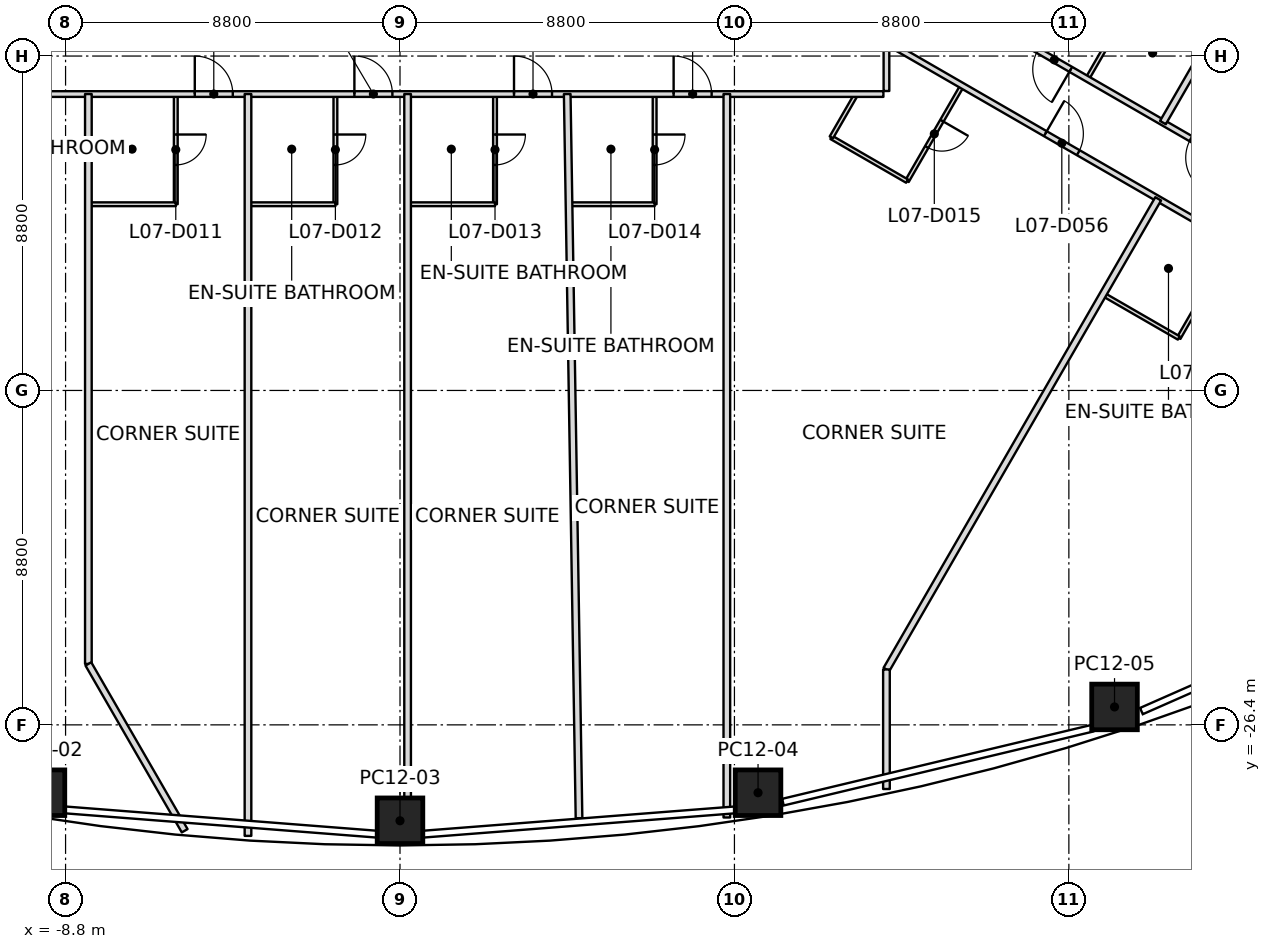
"""IFC4 building model, lengths in metres.
Left out: names, types, materials, properties, quantities, classifications, styles, units other than length and angle.
Written with IfcOpenShell. Run it as: python <this file> out.ifc"""

import sys

from ifc_helpers import new_model, si_unit, direction, frame, frame_2d, origin, origin_2d, place, context, subcontext, project, spatial, rectangle, extrude, clip, halfspace, element, fill, save


model = new_model("IFC4")
c1 = context("Model", 3, precision=1e-05, world=origin(), true_north=direction((0.0, 1.0)))
c2 = subcontext(c1, "Body", "Model", "MODEL_VIEW")
j1 = project(units=[si_unit("LENGTHUNIT", "METRE"), si_unit("PLANEANGLEUNIT", "RADIAN")], contexts=[c1])
p1 = place(None, origin())
s1 = spatial("IfcSite", under=j1, at=p1, CompositionType="ELEMENT")
p2 = place(p1, origin())
s2 = spatial("IfcBuilding", under=s1, at=p2, CompositionType="ELEMENT")
p3 = place(p2, frame((0.0, 0.0, 48.0)))
s3 = spatial("IfcBuildingStorey", under=s2, at=p3, CompositionType="ELEMENT", Elevation=48.0)
p4 = place(p3, frame((-9.421, -28.186, 0.0), z_axis=(0.00938738074, 0.224525572229, 0.97442298028), x_axis=(0.980605744382, -0.192842524507, 0.034987638199)))
e1 = element("IfcColumn", 1, at=p4, inside=s3, PredefinedType="COLUMN", context=c2, shape_type="SweptSolid", body=[
    clip(extrude(rectangle(XDim=1.2, YDim=1.2, at=origin_2d()), origin(), (0.0, 0.0, 1.0), 3.797), halfspace(frame((0.0, 0.0, 0.008)), True)),
])
p5 = place(p3, frame((0.0, -28.924, 0.0), z_axis=(0.0, 0.238749489976, 0.971081191784), x_axis=(-1.0, 0.0, 0.0)))
e2 = element("IfcColumn", 2, at=p5, inside=s3, PredefinedType="COLUMN", context=c2, shape_type="SweptSolid", body=[
    clip(extrude(rectangle(XDim=1.2, YDim=1.2, at=origin_2d()), origin(), (0.0, 0.0, 1.0), 3.81), halfspace(frame((0.0, 0.0, 0.009)), True)),
])
p6 = place(p3, frame((9.421, -28.186, 0.0), z_axis=(-0.00938738074, 0.224525572229, 0.97442298028), x_axis=(-0.980605744382, -0.192842524507, 0.034987638199)))
e3 = element("IfcColumn", 3, at=p6, inside=s3, PredefinedType="COLUMN", context=c2, shape_type="SweptSolid", body=[
    clip(extrude(rectangle(XDim=1.2, YDim=1.2, at=origin_2d()), origin(), (0.0, 0.0, 1.0), 3.797), halfspace(frame((0.0, 0.0, 0.008)), True)),
])
p7 = place(p3, frame((18.802, -25.928, 0.0), z_axis=(-0.019020345186, 0.17825893475, 0.983799765527), x_axis=(0.950332394894, 0.308956292564, -0.037607824987)))
e4 = element("IfcColumn", 4, at=p7, inside=s3, PredefinedType="COLUMN", context=c2, shape_type="SweptSolid", body=[
    clip(clip(extrude(rectangle(XDim=1.2, YDim=1.2, at=origin_2d()), origin(), (0.0, 0.0, 1.0), 3.761), halfspace(frame((0.0, 0.0, 0.008)), True)), halfspace(frame((0.0, 0.0, 3.76)), False)),
])
p8 = place(p3, frame((-8.2, -9.8, 0.0), z_axis=(0.0, 0.0, 1.0), x_axis=(0.0, -1.0, 0.0)))
e5 = element("IfcWall", 5, at=p8, inside=s3, PredefinedType="PARTITIONING", context=c2, shape_type="SweptSolid", body=[
    extrude(rectangle(XDim=14.997, YDim=0.175, at=frame_2d((7.498, 0.0))), origin(), (0.0, 0.0, 1.0), 3.15),
])
p9 = place(p3, frame((-8.2, -24.797, 0.0), z_axis=(0.0, 0.0, 1.0), x_axis=(0.499987891935, -0.866032394266, 0.0)))
e6 = element("IfcWall", 6, at=p9, inside=s3, PredefinedType="PARTITIONING", context=c2, shape_type="SweptSolid", body=[
    extrude(rectangle(XDim=5.069, YDim=0.175, at=frame_2d((2.535, 0.0))), origin(), (0.0, 0.0, 1.0), 2.934),
])
p10 = place(p3, frame((-4.0, -9.8, 0.0), z_axis=(0.0, 0.0, 1.0), x_axis=(0.0, -1.0, 0.0)))
e7 = element("IfcWall", 7, at=p10, inside=s3, PredefinedType="PARTITIONING", context=c2, shape_type="SweptSolid", body=[
    extrude(rectangle(XDim=19.521, YDim=0.175, at=frame_2d((9.761, 0.0))), origin(), (0.0, 0.0, 1.0), 2.934),
])
p11 = place(p3, frame((0.2, -9.8, 0.0), z_axis=(0.0, 0.0, 1.0), x_axis=(0.0, -1.0, 0.0)))
e8 = element("IfcWall", 8, at=p11, inside=s3, PredefinedType="PARTITIONING", context=c2, shape_type="SweptSolid", body=[
    extrude(rectangle(XDim=19.65, YDim=0.175, at=frame_2d((9.825, 0.0))), origin(), (0.0, 0.0, 1.0), 3.15),
])
p12 = place(p3, frame((4.4, -9.8, 0.0), z_axis=(0.0, 0.0, 1.0), x_axis=(0.016306426633, -0.999867041386, 0.0)))
e9 = element("IfcWall", 9, at=p12, inside=s3, PredefinedType="PARTITIONING", context=c2, shape_type="SweptSolid", body=[
    extrude(rectangle(XDim=19.059, YDim=0.175, at=frame_2d((9.53, 0.0))), origin(), (0.0, 0.0, 1.0), 2.934),
])
p13 = place(p3, frame((8.6, -9.8, 0.0), z_axis=(0.0, 0.0, 1.0), x_axis=(0.0, -1.0, 0.0)))
e10 = element("IfcWall", 10, at=p13, inside=s3, PredefinedType="PARTITIONING", context=c2, shape_type="SweptSolid", body=[
    extrude(rectangle(XDim=19.037, YDim=0.175, at=frame_2d((9.519, 0.0))), origin(), (0.0, 0.0, 1.0), 2.934),
])
p14 = place(p3, frame((19.95, -12.558, 0.0), z_axis=(0.0, 0.0, 1.0), x_axis=(-0.500004228592, -0.866022962392, 0.0)))
e11 = element("IfcWall", 11, at=p14, inside=s3, PredefinedType="PARTITIONING", context=c2, shape_type="SweptSolid", body=[
    extrude(rectangle(XDim=14.3, YDim=0.175, at=frame_2d((7.15, 0.0))), origin(), (0.0, 0.0, 1.0), 2.797),
])
p15 = place(p3, frame((12.8, -24.942, 0.0), z_axis=(0.0, 0.0, 1.0), x_axis=(0.0, -1.0, 0.0)))
e12 = element("IfcWall", 12, at=p15, inside=s3, PredefinedType="PARTITIONING", context=c2, shape_type="SweptSolid", body=[
    extrude(rectangle(XDim=3.146, YDim=0.175, at=frame_2d((1.573, 0.0))), origin(), (0.0, 0.0, 1.0), 2.934),
])
p16 = place(p3, frame((20.075, -10.551, 0.0), z_axis=(0.0, 0.0, 1.0), x_axis=(0.499996220184, 0.866027586051, 0.0)))
e13 = element("IfcWall", 13, at=p16, inside=s3, PredefinedType="PARTITIONING", context=c2, shape_type="SweptSolid", body=[
    extrude(rectangle(XDim=12.274, YDim=0.175, at=frame_2d((6.137, 0.0))), origin(), (0.0, 0.0, 1.0), 2.934),
])
p17 = place(p3, frame((-12.72, -9.8, 0.0), z_axis=(0.0, 0.0, 1.0), x_axis=(1.0, 0.0, 0.0)))
e14 = element("IfcWall", 14, at=p17, inside=s3, PredefinedType="PARTITIONING", context=c2, shape_type="SweptSolid", body=[
    extrude(rectangle(XDim=25.44, YDim=0.15, at=frame_2d((12.72, 0.0))), origin(), (0.0, 0.0, 1.0), 2.947),
])
p18 = place(p17, frame((7.32, 0.0, 0.0)))
e15 = element("IfcOpeningElement", 15, at=p18, cuts=e14, PredefinedType="OPENING", context=c2, shape_type="SweptSolid", body=[
    extrude(rectangle(XDim=1.0, YDim=2.1, at=frame_2d((0.5, 1.05))), frame((0.0, 0.075, 0.0), z_axis=(0.0, -1.0, 0.0), x_axis=(1.0, 0.0, 0.0)), (0.0, 0.0, 1.0), 0.15),
])
p19 = place(p17, frame((11.52, 0.0, 0.0)))
e16 = element("IfcOpeningElement", 16, at=p19, cuts=e14, PredefinedType="OPENING", context=c2, shape_type="SweptSolid", body=[
    extrude(rectangle(XDim=1.0, YDim=2.1, at=frame_2d((0.5, 1.05))), frame((0.0, 0.075, 0.0), z_axis=(0.0, -1.0, 0.0), x_axis=(1.0, 0.0, 0.0)), (0.0, 0.0, 1.0), 0.15),
])
p20 = place(p17, frame((15.72, 0.0, 0.0)))
e17 = element("IfcOpeningElement", 17, at=p20, cuts=e14, PredefinedType="OPENING", context=c2, shape_type="SweptSolid", body=[
    extrude(rectangle(XDim=1.0, YDim=2.1, at=frame_2d((0.5, 1.05))), frame((0.0, 0.075, 0.0), z_axis=(0.0, -1.0, 0.0), x_axis=(1.0, 0.0, 0.0)), (0.0, 0.0, 1.0), 0.15),
])
p21 = place(p17, frame((19.92, 0.0, 0.0)))
e18 = element("IfcOpeningElement", 18, at=p21, cuts=e14, PredefinedType="OPENING", context=c2, shape_type="SweptSolid", body=[
    extrude(rectangle(XDim=1.0, YDim=2.1, at=frame_2d((0.5, 1.05))), frame((0.0, 0.075, 0.0), z_axis=(0.0, -1.0, 0.0), x_axis=(1.0, 0.0, 0.0)), (0.0, 0.0, 1.0), 0.15),
])
p22 = place(p3, frame((12.8, -9.72, 0.0), z_axis=(0.0, 0.0, 1.0), x_axis=(0.0, 1.0, 0.0)))
e19 = element("IfcWall", 19, at=p22, inside=s3, PredefinedType="PARTITIONING", context=c2, shape_type="SweptSolid", body=[
    extrude(rectangle(XDim=1.291, YDim=0.15, at=frame_2d((0.646, 0.0))), origin(), (0.0, 0.0, 1.0), 2.797),
])
p23 = place(p3, frame((12.879, -8.475, 0.0), z_axis=(0.0, 0.0, 1.0), x_axis=(0.866021836803, -0.500006178143, 0.0)))
e20 = element("IfcWall", 20, at=p23, inside=s3, PredefinedType="PARTITIONING", context=c2, shape_type="SweptSolid", body=[
    extrude(rectangle(XDim=12.365, YDim=0.15, at=frame_2d((6.182, 0.0))), origin(), (0.0, 0.0, 1.0), 2.797),
])
p24 = place(p23, frame((4.737, 0.0, 0.0)))
e21 = element("IfcOpeningElement", 21, at=p24, cuts=e20, PredefinedType="OPENING", context=c2, shape_type="SweptSolid", body=[
    extrude(rectangle(XDim=1.0, YDim=2.1, at=frame_2d((0.5, 1.05))), frame((0.0, 0.075, 0.0), z_axis=(0.0, -1.0, 0.0), x_axis=(1.0, 0.0, 0.0)), (0.0, 0.0, 1.0), 0.15),
])
p25 = place(p23, frame((10.965, 0.0, 0.0)))
e22 = element("IfcOpeningElement", 22, at=p25, cuts=e20, PredefinedType="OPENING", context=c2, shape_type="SweptSolid", body=[
    extrude(rectangle(XDim=1.0, YDim=2.1, at=frame_2d((0.5, 1.05))), frame((0.0, 0.075, 0.0), z_axis=(0.0, -1.0, 0.0), x_axis=(1.0, 0.0, 0.0)), (0.0, 0.0, 1.0), 0.15),
])
p26 = place(p3, frame((24.418, -13.059, 0.0), z_axis=(0.0, 0.0, 1.0), x_axis=(-0.866024967305, 0.500000756004, 0.0)))
e23 = element("IfcWall", 23, at=p26, inside=s3, PredefinedType="PARTITIONING", context=c2, shape_type="SweptSolid", body=[
    extrude(rectangle(XDim=13.416, YDim=0.15, at=frame_2d((6.708, 0.0))), origin(), (0.0, 0.0, 1.0), 2.947),
])
p27 = place(p26, frame((3.168, 0.0, 0.0)))
e24 = element("IfcOpeningElement", 24, at=p27, cuts=e23, PredefinedType="OPENING", context=c2, shape_type="SweptSolid", body=[
    extrude(rectangle(XDim=1.0, YDim=2.1, at=frame_2d((0.5, 1.05))), frame((0.0, 0.075, 0.0), z_axis=(0.0, -1.0, 0.0), x_axis=(1.0, 0.0, 0.0)), (0.0, 0.0, 1.0), 0.15),
])
p28 = place(p26, frame((7.815, 0.0, 0.0)))
e25 = element("IfcOpeningElement", 25, at=p28, cuts=e23, PredefinedType="OPENING", context=c2, shape_type="SweptSolid", body=[
    extrude(rectangle(XDim=1.0, YDim=2.1, at=frame_2d((0.5, 1.05))), frame((0.0, 0.075, 0.0), z_axis=(0.0, -1.0, 0.0), x_axis=(1.0, 0.0, 0.0)), (0.0, 0.0, 1.0), 0.15),
])
p29 = place(p3, frame((-5.9, -9.83, 0.0), z_axis=(0.0, 0.0, 1.0), x_axis=(0.0, -1.0, 0.0)))
e26 = element("IfcWall", 26, at=p29, inside=s3, PredefinedType="PARTITIONING", context=c2, shape_type="SweptSolid", body=[
    extrude(rectangle(XDim=2.87, YDim=0.1, at=frame_2d((1.435, 0.0))), origin(), (0.0, 0.0, 1.0), 3.15),
])
p30 = place(p29, frame((1.035, 0.0, 0.0)))
e27 = element("IfcOpeningElement", 27, at=p30, cuts=e26, PredefinedType="OPENING", context=c2, shape_type="SweptSolid", body=[
    extrude(rectangle(XDim=0.8, YDim=2.1, at=frame_2d((0.4, 1.05))), frame((0.0, 0.05, 0.0), z_axis=(0.0, -1.0, 0.0), x_axis=(1.0, 0.0, 0.0)), (0.0, 0.0, 1.0), 0.1),
])
p31 = place(p3, frame((-5.9, -12.7, 0.0), z_axis=(0.0, 0.0, 1.0), x_axis=(-1.0, 0.0, 0.0)))
e28 = element("IfcWall", 28, at=p31, inside=s3, PredefinedType="PARTITIONING", context=c2, shape_type="SweptSolid", body=[
    extrude(rectangle(XDim=2.27, YDim=0.1, at=frame_2d((1.135, 0.0))), origin(), (0.0, 0.0, 1.0), 2.947),
])
p32 = place(p3, frame((-1.7, -9.83, 0.0), z_axis=(0.0, 0.0, 1.0), x_axis=(0.0, -1.0, 0.0)))
e29 = element("IfcWall", 29, at=p32, inside=s3, PredefinedType="PARTITIONING", context=c2, shape_type="SweptSolid", body=[
    extrude(rectangle(XDim=2.87, YDim=0.1, at=frame_2d((1.435, 0.0))), origin(), (0.0, 0.0, 1.0), 3.15),
])
p33 = place(p32, frame((1.035, 0.0, 0.0)))
e30 = element("IfcOpeningElement", 30, at=p33, cuts=e29, PredefinedType="OPENING", context=c2, shape_type="SweptSolid", body=[
    extrude(rectangle(XDim=0.8, YDim=2.1, at=frame_2d((0.4, 1.05))), frame((0.0, 0.05, 0.0), z_axis=(0.0, -1.0, 0.0), x_axis=(1.0, 0.0, 0.0)), (0.0, 0.0, 1.0), 0.1),
])
p34 = place(p3, frame((-1.7, -12.7, 0.0), z_axis=(0.0, 0.0, 1.0), x_axis=(-1.0, 0.0, 0.0)))
e31 = element("IfcWall", 31, at=p34, inside=s3, PredefinedType="PARTITIONING", context=c2, shape_type="SweptSolid", body=[
    extrude(rectangle(XDim=2.27, YDim=0.1, at=frame_2d((1.135, 0.0))), origin(), (0.0, 0.0, 1.0), 2.947),
])
p35 = place(p3, frame((2.5, -9.83, 0.0), z_axis=(0.0, 0.0, 1.0), x_axis=(0.0, -1.0, 0.0)))
e32 = element("IfcWall", 32, at=p35, inside=s3, PredefinedType="PARTITIONING", context=c2, shape_type="SweptSolid", body=[
    extrude(rectangle(XDim=2.87, YDim=0.1, at=frame_2d((1.435, 0.0))), origin(), (0.0, 0.0, 1.0), 3.15),
])
p36 = place(p35, frame((1.035, 0.0, 0.0)))
e33 = element("IfcOpeningElement", 33, at=p36, cuts=e32, PredefinedType="OPENING", context=c2, shape_type="SweptSolid", body=[
    extrude(rectangle(XDim=0.8, YDim=2.1, at=frame_2d((0.4, 1.05))), frame((0.0, 0.05, 0.0), z_axis=(0.0, -1.0, 0.0), x_axis=(1.0, 0.0, 0.0)), (0.0, 0.0, 1.0), 0.1),
])
p37 = place(p3, frame((2.5, -12.7, 0.0), z_axis=(0.0, 0.0, 1.0), x_axis=(-1.0, 0.0, 0.0)))
e34 = element("IfcWall", 34, at=p37, inside=s3, PredefinedType="PARTITIONING", context=c2, shape_type="SweptSolid", body=[
    extrude(rectangle(XDim=2.27, YDim=0.1, at=frame_2d((1.135, 0.0))), origin(), (0.0, 0.0, 1.0), 3.15),
])
p38 = place(p3, frame((6.7, -9.83, 0.0), z_axis=(0.0, 0.0, 1.0), x_axis=(0.0, -1.0, 0.0)))
e35 = element("IfcWall", 35, at=p38, inside=s3, PredefinedType="PARTITIONING", context=c2, shape_type="SweptSolid", body=[
    extrude(rectangle(XDim=2.87, YDim=0.1, at=frame_2d((1.435, 0.0))), origin(), (0.0, 0.0, 1.0), 3.15),
])
p39 = place(p38, frame((1.035, 0.0, 0.0)))
e36 = element("IfcOpeningElement", 36, at=p39, cuts=e35, PredefinedType="OPENING", context=c2, shape_type="SweptSolid", body=[
    extrude(rectangle(XDim=0.8, YDim=2.1, at=frame_2d((0.4, 1.05))), frame((0.0, 0.05, 0.0), z_axis=(0.0, -1.0, 0.0), x_axis=(1.0, 0.0, 0.0)), (0.0, 0.0, 1.0), 0.1),
])
p40 = place(p3, frame((6.7, -12.7, 0.0), z_axis=(0.0, 0.0, 1.0), x_axis=(-1.0, 0.0, 0.0)))
e37 = element("IfcWall", 37, at=p40, inside=s3, PredefinedType="PARTITIONING", context=c2, shape_type="SweptSolid", body=[
    extrude(rectangle(XDim=2.27, YDim=0.1, at=frame_2d((1.135, 0.0))), origin(), (0.0, 0.0, 1.0), 2.947),
])
p41 = place(p3, frame((14.777, -9.605, 0.0), z_axis=(0.0, 0.0, 1.0), x_axis=(-0.499999802827, -0.866025517622, 0.0)))
e38 = element("IfcWall", 38, at=p41, inside=s3, PredefinedType="PARTITIONING", context=c2, shape_type="SweptSolid", body=[
    extrude(rectangle(XDim=2.87, YDim=0.1, at=frame_2d((1.435, 0.0))), origin(), (0.0, 0.0, 1.0), 2.797),
])
p42 = place(p41, frame((1.035, 0.0, 0.0)))
e39 = element("IfcOpeningElement", 39, at=p42, cuts=e38, PredefinedType="OPENING", context=c2, shape_type="SweptSolid", body=[
    extrude(rectangle(XDim=0.8, YDim=2.1, at=frame_2d((0.4, 1.05))), frame((0.0, 0.05, 0.0), z_axis=(0.0, -1.0, 0.0), x_axis=(1.0, 0.0, 0.0)), (0.0, 0.0, 1.0), 0.1),
])
p43 = place(p3, frame((13.342, -12.091, 0.0), z_axis=(0.0, 0.0, 1.0), x_axis=(-0.86602648383, 0.499998129301, 0.0)))
e40 = element("IfcWall", 40, at=p43, inside=s3, PredefinedType="PARTITIONING", context=c2, shape_type="SweptSolid", body=[
    extrude(rectangle(XDim=2.3, YDim=0.1, at=frame_2d((1.15, 0.0))), origin(), (0.0, 0.0, 1.0), 2.947),
])
p44 = place(p3, frame((11.35, -10.941, 0.0), z_axis=(0.0, 0.0, 1.0), x_axis=(0.499865263774, 0.866103179807, 0.0)))
e41 = element("IfcWall", 41, at=p44, inside=s3, PredefinedType="PARTITIONING", context=c2, shape_type="SweptSolid", body=[
    extrude(rectangle(XDim=1.282, YDim=0.1, at=frame_2d((0.641, 0.0))), origin(), (0.0, 0.0, 1.0), 3.15),
])
p45 = place(p3, frame((18.098, -9.375, 0.0), z_axis=(0.0, 0.0, 1.0), x_axis=(0.499936001555, 0.866062350151, 0.0)))
e42 = element("IfcWall", 42, at=p45, inside=s3, PredefinedType="PARTITIONING", context=c2, shape_type="SweptSolid", body=[
    extrude(rectangle(XDim=2.87, YDim=0.1, at=frame_2d((1.435, 0.0))), origin(), (0.0, 0.0, 1.0), 2.947),
])
p46 = place(p45, frame((1.035, 0.0, 0.0)))
e43 = element("IfcOpeningElement", 43, at=p46, cuts=e42, PredefinedType="OPENING", context=c2, shape_type="SweptSolid", body=[
    extrude(rectangle(XDim=0.8, YDim=2.1, at=frame_2d((0.4, 1.05))), frame((0.0, 0.05, 0.0), z_axis=(0.0, -1.0, 0.0), x_axis=(1.0, 0.0, 0.0)), (0.0, 0.0, 1.0), 0.1),
])
p47 = place(p3, frame((21.927, -13.733, 0.0), z_axis=(0.0, 0.0, 1.0), x_axis=(-0.499936001555, -0.866062350151, 0.0)))
e44 = element("IfcWall", 44, at=p47, inside=s3, PredefinedType="PARTITIONING", context=c2, shape_type="SweptSolid", body=[
    extrude(rectangle(XDim=2.87, YDim=0.1, at=frame_2d((1.435, 0.0))), origin(), (0.0, 0.0, 1.0), 3.15),
])
p48 = place(p47, frame((1.035, 0.0, 0.0)))
e45 = element("IfcOpeningElement", 45, at=p48, cuts=e44, PredefinedType="OPENING", context=c2, shape_type="SweptSolid", body=[
    extrude(rectangle(XDim=0.8, YDim=2.1, at=frame_2d((0.4, 1.05))), frame((0.0, 0.05, 0.0), z_axis=(0.0, -1.0, 0.0), x_axis=(1.0, 0.0, 0.0)), (0.0, 0.0, 1.0), 0.1),
])
p49 = place(p3, frame((20.492, -16.219, 0.0), z_axis=(0.0, 0.0, 1.0), x_axis=(-0.866044110172, 0.499967598186, 0.0)))
e46 = element("IfcWall", 46, at=p49, inside=s3, PredefinedType="PARTITIONING", context=c2, shape_type="SweptSolid", body=[
    extrude(rectangle(XDim=2.27, YDim=0.1, at=frame_2d((1.135, 0.0))), origin(), (0.0, 0.0, 1.0), 3.15),
])
p50 = place(p18, origin())
e47 = element("IfcDoor", 47, at=p50, inside=s3, OperationType="SINGLE_SWING_LEFT", PredefinedType="DOOR", context=c2, shape_type="SweptSolid", body=[
    extrude(rectangle(XDim=1.0, YDim=2.1, at=frame_2d((0.5, 1.05))), frame((0.0, 0.025, 0.0), z_axis=(0.0, -1.0, 0.0), x_axis=(1.0, 0.0, 0.0)), (0.0, 0.0, 1.0), 0.05),
])
fill(e15, e47)
p51 = place(p30, origin())
e48 = element("IfcDoor", 48, at=p51, inside=s3, OperationType="SINGLE_SWING_LEFT", PredefinedType="DOOR", context=c2, shape_type="SweptSolid", body=[
    extrude(rectangle(XDim=0.8, YDim=2.1, at=frame_2d((0.4, 1.05))), frame((0.0, 0.025, 0.0), z_axis=(0.0, -1.0, 0.0), x_axis=(1.0, 0.0, 0.0)), (0.0, 0.0, 1.0), 0.05),
])
fill(e27, e48)
p52 = place(p19, origin())
e49 = element("IfcDoor", 49, at=p52, inside=s3, OperationType="SINGLE_SWING_LEFT", PredefinedType="DOOR", context=c2, shape_type="SweptSolid", body=[
    extrude(rectangle(XDim=1.0, YDim=2.1, at=frame_2d((0.5, 1.05))), frame((0.0, 0.025, 0.0), z_axis=(0.0, -1.0, 0.0), x_axis=(1.0, 0.0, 0.0)), (0.0, 0.0, 1.0), 0.05),
])
fill(e16, e49)
p53 = place(p33, origin())
e50 = element("IfcDoor", 50, at=p53, inside=s3, OperationType="SINGLE_SWING_RIGHT", PredefinedType="DOOR", context=c2, shape_type="SweptSolid", body=[
    extrude(rectangle(XDim=0.8, YDim=2.1, at=frame_2d((0.4, 1.05))), frame((0.0, 0.025, 0.0), z_axis=(0.0, -1.0, 0.0), x_axis=(1.0, 0.0, 0.0)), (0.0, 0.0, 1.0), 0.05),
])
fill(e30, e50)
p54 = place(p20, origin())
e51 = element("IfcDoor", 51, at=p54, inside=s3, OperationType="SINGLE_SWING_LEFT", PredefinedType="DOOR", context=c2, shape_type="SweptSolid", body=[
    extrude(rectangle(XDim=1.0, YDim=2.1, at=frame_2d((0.5, 1.05))), frame((0.0, 0.025, 0.0), z_axis=(0.0, -1.0, 0.0), x_axis=(1.0, 0.0, 0.0)), (0.0, 0.0, 1.0), 0.05),
])
fill(e17, e51)
p55 = place(p36, origin())
e52 = element("IfcDoor", 52, at=p55, inside=s3, OperationType="SINGLE_SWING_LEFT", PredefinedType="DOOR", context=c2, shape_type="SweptSolid", body=[
    extrude(rectangle(XDim=0.8, YDim=2.1, at=frame_2d((0.4, 1.05))), frame((0.0, 0.025, 0.0), z_axis=(0.0, -1.0, 0.0), x_axis=(1.0, 0.0, 0.0)), (0.0, 0.0, 1.0), 0.05),
])
fill(e33, e52)
p56 = place(p21, origin())
e53 = element("IfcDoor", 53, at=p56, inside=s3, OperationType="SINGLE_SWING_LEFT", PredefinedType="DOOR", context=c2, shape_type="SweptSolid", body=[
    extrude(rectangle(XDim=1.0, YDim=2.1, at=frame_2d((0.5, 1.05))), frame((0.0, 0.025, 0.0), z_axis=(0.0, -1.0, 0.0), x_axis=(1.0, 0.0, 0.0)), (0.0, 0.0, 1.0), 0.05),
])
fill(e18, e53)
p57 = place(p39, origin())
e54 = element("IfcDoor", 54, at=p57, inside=s3, OperationType="SINGLE_SWING_LEFT", PredefinedType="DOOR", context=c2, shape_type="SweptSolid", body=[
    extrude(rectangle(XDim=0.8, YDim=2.1, at=frame_2d((0.4, 1.05))), frame((0.0, 0.025, 0.0), z_axis=(0.0, -1.0, 0.0), x_axis=(1.0, 0.0, 0.0)), (0.0, 0.0, 1.0), 0.05),
])
fill(e36, e54)
p58 = place(p24, origin())
e55 = element("IfcDoor", 55, at=p58, inside=s3, OperationType="SINGLE_SWING_LEFT", PredefinedType="DOOR", context=c2, shape_type="SweptSolid", body=[
    extrude(rectangle(XDim=1.0, YDim=2.1, at=frame_2d((0.5, 1.05))), frame((0.0, 0.025, 0.0), z_axis=(0.0, -1.0, 0.0), x_axis=(1.0, 0.0, 0.0)), (0.0, 0.0, 1.0), 0.05),
])
fill(e21, e55)
p59 = place(p42, origin())
e56 = element("IfcDoor", 56, at=p59, inside=s3, OperationType="SINGLE_SWING_LEFT", PredefinedType="DOOR", context=c2, shape_type="SweptSolid", body=[
    extrude(rectangle(XDim=0.8, YDim=2.1, at=frame_2d((0.4, 1.05))), frame((0.0, 0.025, 0.0), z_axis=(0.0, -1.0, 0.0), x_axis=(1.0, 0.0, 0.0)), (0.0, 0.0, 1.0), 0.05),
])
fill(e39, e56)
p60 = place(p27, origin())
e57 = element("IfcDoor", 57, at=p60, inside=s3, OperationType="SINGLE_SWING_LEFT", PredefinedType="DOOR", context=c2, shape_type="SweptSolid", body=[
    extrude(rectangle(XDim=1.0, YDim=2.1, at=frame_2d((0.5, 1.05))), frame((0.0, 0.025, 0.0), z_axis=(0.0, -1.0, 0.0), x_axis=(1.0, 0.0, 0.0)), (0.0, 0.0, 1.0), 0.05),
])
fill(e24, e57)
p61 = place(p28, origin())
e58 = element("IfcDoor", 58, at=p61, inside=s3, OperationType="SINGLE_SWING_LEFT", PredefinedType="DOOR", context=c2, shape_type="SweptSolid", body=[
    extrude(rectangle(XDim=1.0, YDim=2.1, at=frame_2d((0.5, 1.05))), frame((0.0, 0.025, 0.0), z_axis=(0.0, -1.0, 0.0), x_axis=(1.0, 0.0, 0.0)), (0.0, 0.0, 1.0), 0.05),
])
fill(e25, e58)
save(model, sys.argv[1])
